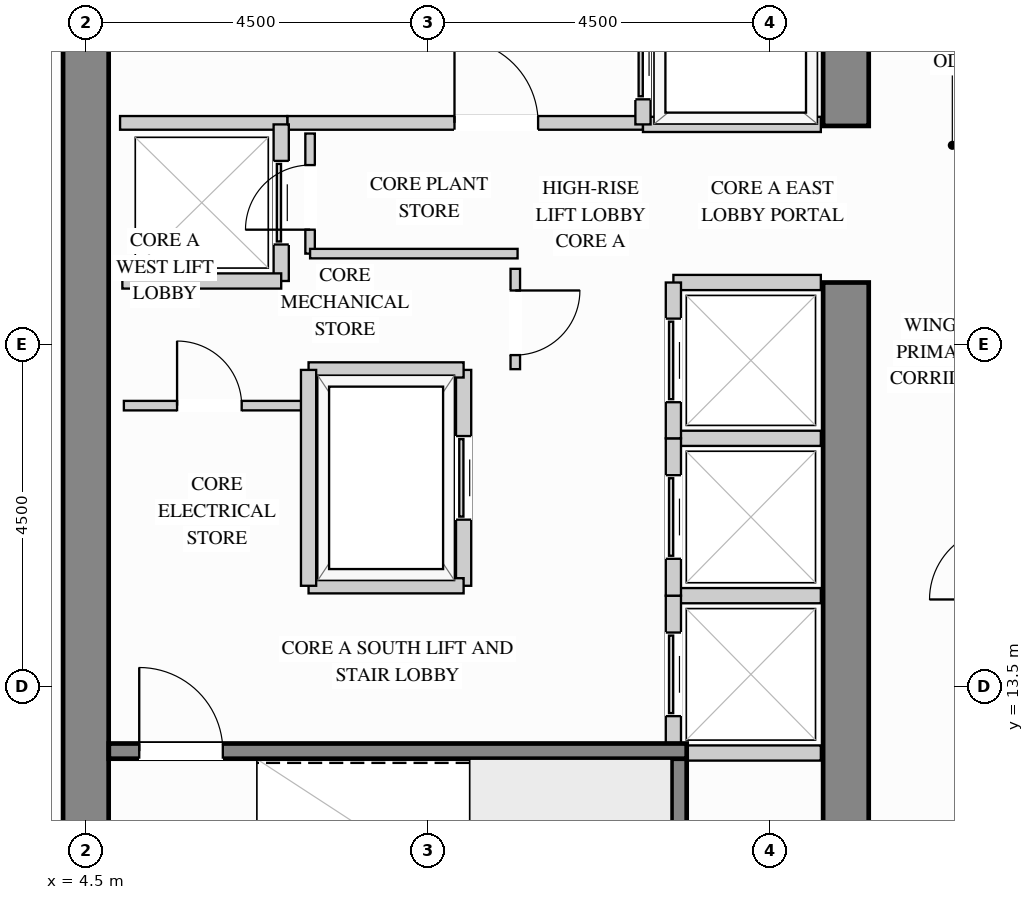
"""IFC4 building model, lengths in metres.
Left out: names, types, materials, properties, quantities, classifications, styles, units other than length and angle.
Written with IfcOpenShell. Run it as: python <this file> out.ifc"""

import sys

from ifc_helpers import new_model, si_unit, direction, frame, frame_2d, origin, place, context, subcontext, project, spatial, rectangle, extrude, source, transform, mapped, element, fill, save


model = new_model("IFC4")
c1 = context("Model", 3, precision=1e-05, world=origin(), true_north=direction((0.0, 1.0)))
c2 = subcontext(c1, "Body", "Model", "MODEL_VIEW")
j1 = project(units=[si_unit("LENGTHUNIT", "METRE"), si_unit("PLANEANGLEUNIT", "RADIAN")], contexts=[c1])
p1 = place(None, origin())
s1 = spatial("IfcSite", under=j1, at=p1, CompositionType="ELEMENT")
p2 = place(p1, origin())
s2 = spatial("IfcBuilding", under=s1, at=p2, CompositionType="ELEMENT")
p3 = place(p2, frame((0.0, 0.0, 197.1)))
s3 = spatial("IfcBuildingStorey", under=s2, at=p3, CompositionType="ELEMENT", Elevation=197.1)
m1 = source(origin(), c2, "Body", "SweptSolid", [
    extrude(rectangle(XDim=10.02, YDim=0.6, at=frame_2d((5.01, 0.0))), origin(), (0.0, 0.0, 1.0), 3.4),
])
p4 = place(p3, frame((14.5, 8.8, 0.0), z_axis=(0.0, 0.0, 1.0), x_axis=(0.0, 1.0, 0.0)))
e1 = element("IfcWall", 1, at=p4, inside=s3, PredefinedType="SHEAR", context=c2, shape_type="MappedRepresentation", body=[
    mapped(m1, transform((0.0, 0.0, 0.0), x_axis=(1.0, 0.0, 0.0), y_axis=(0.0, 1.0, 0.0), z_axis=(0.0, 0.0, 1.0))),
])
m2 = source(origin(), c2, "Body", "SweptSolid", [
    extrude(rectangle(XDim=8.32, YDim=0.6, at=frame_2d((4.16, 0.0))), origin(), (0.0, 0.0, 1.0), 3.4),
])
p5 = place(p3, frame((14.5, 20.88, 0.0), z_axis=(0.0, 0.0, 1.0), x_axis=(0.0, 1.0, 0.0)))
e2 = element("IfcWall", 2, at=p5, inside=s3, PredefinedType="SHEAR", context=c2, shape_type="MappedRepresentation", body=[
    mapped(m2, transform((0.0, 0.0, 0.0), x_axis=(1.0, 0.0, 0.0), y_axis=(0.0, 1.0, 0.0), z_axis=(0.0, 0.0, 1.0))),
])
m3 = source(origin(), c2, "Body", "SweptSolid", [
    extrude(rectangle(XDim=20.4, YDim=0.6, at=frame_2d((10.2, 0.0))), origin(), (0.0, 0.0, 1.0), 3.4),
])
p6 = place(p3, frame((4.5, 8.8, 0.0), z_axis=(0.0, 0.0, 1.0), x_axis=(0.0, 1.0, 0.0)))
e3 = element("IfcWall", 3, at=p6, inside=s3, PredefinedType="SHEAR", context=c2, shape_type="MappedRepresentation", body=[
    mapped(m3, transform((0.0, 0.0, 0.0), x_axis=(1.0, 0.0, 0.0), y_axis=(0.0, 1.0, 0.0), z_axis=(0.0, 0.0, 1.0))),
])
p7 = place(p3, frame((7.15, 20.92, 0.0), z_axis=(0.0, 0.0, 1.0), x_axis=(1.0, 0.0, 0.0)))
e4 = element("IfcWall", 4, at=p7, inside=s3, PredefinedType="PARTITIONING", context=c2, shape_type="SweptSolid", body=[
    extrude(rectangle(XDim=4.68, YDim=0.18, at=frame_2d((2.34, 0.0))), origin(), (0.0, 0.0, 1.0), 3.385),
])
p8 = place(p7, frame((2.2, 0.0, 0.0)))
e5 = element("IfcOpeningElement", 5, at=p8, cuts=e4, PredefinedType="OPENING", context=c2, shape_type="SweptSolid", body=[
    extrude(rectangle(XDim=1.1, YDim=2.15, at=frame_2d((0.55, 1.075))), frame((0.0, 0.1, 0.0), z_axis=(0.0, -1.0, 0.0), x_axis=(1.0, 0.0, 0.0)), (0.0, 0.0, 1.0), 0.2),
])
m4 = source(origin(), c2, "Body", "SweptSolid", [
    extrude(rectangle(XDim=2.2, YDim=0.18, at=frame_2d((1.1, 0.0))), origin(), (0.0, 0.0, 1.0), 3.385),
])
p9 = place(p3, frame((4.95, 20.92, 0.0), z_axis=(0.0, 0.0, 1.0), x_axis=(1.0, 0.0, 0.0)))
e6 = element("IfcWall", 6, at=p9, inside=s3, PredefinedType="PARTITIONING", context=c2, shape_type="MappedRepresentation", body=[
    mapped(m4, transform((0.0, 0.0, 0.0), x_axis=(1.0, 0.0, 0.0), y_axis=(0.0, 1.0, 0.0), z_axis=(0.0, 0.0, 1.0))),
])
p10 = place(p3, frame((10.15, 17.68, 0.0), z_axis=(0.0, 0.0, 1.0), x_axis=(0.0, 1.0, 0.0)))
e7 = element("IfcWall", 7, at=p10, inside=s3, PredefinedType="PARTITIONING", context=c2, shape_type="SweptSolid", body=[
    extrude(rectangle(XDim=1.32, YDim=0.125, at=frame_2d((0.66, 0.0))), origin(), (0.0, 0.0, 1.0), 3.385),
])
p11 = place(p10, frame((0.185, 0.0, 0.0)))
e8 = element("IfcOpeningElement", 8, at=p11, cuts=e7, PredefinedType="OPENING", context=c2, shape_type="SweptSolid", body=[
    extrude(rectangle(XDim=0.85, YDim=2.1, at=frame_2d((0.425, 1.05))), frame((0.0, 0.073, 0.0), z_axis=(0.0, -1.0, 0.0), x_axis=(1.0, 0.0, 0.0)), (0.0, 0.0, 1.0), 0.145),
])
p12 = place(p3, frame((7.45, 19.2, 0.0), z_axis=(0.0, 0.0, 1.0), x_axis=(0.0, 1.0, 0.0)))
e9 = element("IfcWall", 9, at=p12, inside=s3, PredefinedType="PARTITIONING", context=c2, shape_type="SweptSolid", body=[
    extrude(rectangle(XDim=1.58, YDim=0.125, at=frame_2d((0.79, 0.0))), origin(), (0.0, 0.0, 1.0), 3.385),
])
p13 = place(p12, frame((0.315, 0.0, 0.0)))
e10 = element("IfcOpeningElement", 10, at=p13, cuts=e9, PredefinedType="OPENING", context=c2, shape_type="SweptSolid", body=[
    extrude(rectangle(XDim=0.85, YDim=2.1, at=frame_2d((0.425, 1.05))), frame((0.0, 0.073, 0.0), z_axis=(0.0, -1.0, 0.0), x_axis=(1.0, 0.0, 0.0)), (0.0, 0.0, 1.0), 0.145),
])
m5 = source(origin(), c2, "Body", "SweptSolid", [
    extrude(rectangle(XDim=2.73, YDim=0.125, at=frame_2d((1.365, 0.0))), origin(), (0.0, 0.0, 1.0), 3.385),
])
p14 = place(p3, frame((7.45, 19.2, 0.0), z_axis=(0.0, 0.0, 1.0), x_axis=(1.0, 0.0, 0.0)))
e11 = element("IfcWall", 11, at=p14, inside=s3, PredefinedType="PARTITIONING", context=c2, shape_type="MappedRepresentation", body=[
    mapped(m5, transform((0.0, 0.0, 0.0), x_axis=(1.0, 0.0, 0.0), y_axis=(0.0, 1.0, 0.0), z_axis=(0.0, 0.0, 1.0))),
])
p15 = place(p3, frame((5.0, 17.2, 0.0), z_axis=(0.0, 0.0, 1.0), x_axis=(1.0, 0.0, 0.0)))
e12 = element("IfcWall", 12, at=p15, inside=s3, PredefinedType="PARTITIONING", context=c2, shape_type="SweptSolid", body=[
    extrude(rectangle(XDim=2.4, YDim=0.125, at=frame_2d((1.2, 0.0))), origin(), (0.0, 0.0, 1.0), 3.385),
])
p16 = place(p15, frame((0.7, 0.0, 0.0)))
e13 = element("IfcOpeningElement", 13, at=p16, cuts=e12, PredefinedType="OPENING", context=c2, shape_type="SweptSolid", body=[
    extrude(rectangle(XDim=0.85, YDim=2.1, at=frame_2d((0.425, 1.05))), frame((0.0, 0.073, 0.0), z_axis=(0.0, -1.0, 0.0), x_axis=(1.0, 0.0, 0.0)), (0.0, 0.0, 1.0), 0.145),
])
m6 = source(origin(), c2, "Body", "SweptSolid", [
    extrude(rectangle(XDim=2.34, YDim=0.2, at=frame_2d((1.17, 0.0))), origin(), (0.0, 0.0, 1.0), 3.385),
])
p17 = place(p3, frame((11.83, 20.9, 0.0), z_axis=(0.0, 0.0, 1.0), x_axis=(1.0, 0.0, 0.0)))
e14 = element("IfcWall", 14, at=p17, inside=s3, PredefinedType="PARTITIONING", context=c2, shape_type="MappedRepresentation", body=[
    mapped(m6, transform((0.0, 0.0, 0.0), x_axis=(1.0, 0.0, 0.0), y_axis=(0.0, 1.0, 0.0), z_axis=(0.0, 0.0, 1.0))),
])
p18 = place(p3, frame((11.83, 20.9, 0.0), z_axis=(0.0, 0.0, 1.0), x_axis=(0.0, 1.0, 0.0)))
e15 = element("IfcWall", 15, at=p18, inside=s3, PredefinedType="PARTITIONING", context=c2, shape_type="SweptSolid", body=[
    extrude(rectangle(XDim=1.76, YDim=0.2, at=frame_2d((0.88, 0.0))), origin(), (0.0, 0.0, 1.0), 3.385),
])
p19 = place(p18, frame((0.33, 0.0, 0.0)))
e16 = element("IfcOpeningElement", 16, at=p19, cuts=e15, PredefinedType="OPENING", context=c2, shape_type="SweptSolid", body=[
    extrude(rectangle(XDim=1.1, YDim=2.2, at=frame_2d((0.55, 1.1))), frame((0.0, 0.11, 0.0), z_axis=(0.0, -1.0, 0.0), x_axis=(1.0, 0.0, 0.0)), (0.0, 0.0, 1.0), 0.22),
])
m7 = source(origin(), c2, "Body", "SweptSolid", [
    extrude(rectangle(XDim=1.94, YDim=0.2, at=frame_2d((0.97, 0.0))), origin(), (0.0, 0.0, 1.0), 3.385),
])
for number, where, z_axis, x_axis in (
    (17, (12.23, 14.7, 0.0), (0.0, 0.0, 1.0), (1.0, 0.0, 0.0)),
    (18, (12.23, 12.63, 0.0), (0.0, 0.0, 1.0), (1.0, 0.0, 0.0)),
):
    element("IfcWall", number, at=place(p3, frame(where, z_axis=z_axis, x_axis=x_axis)), inside=s3, PredefinedType="PARTITIONING", context=c2, shape_type="MappedRepresentation", body=[
        mapped(m7, transform((0.0, 0.0, 0.0), x_axis=(1.0, 0.0, 0.0), y_axis=(0.0, 1.0, 0.0), z_axis=(0.0, 0.0, 1.0))),
    ])
p20 = place(p3, frame((12.23, 12.63, 0.0), z_axis=(0.0, 0.0, 1.0), x_axis=(0.0, 1.0, 0.0)))
e19 = element("IfcWall", 19, at=p20, inside=s3, PredefinedType="PARTITIONING", context=c2, shape_type="SweptSolid", body=[
    extrude(rectangle(XDim=2.07, YDim=0.2, at=frame_2d((1.035, 0.0))), origin(), (0.0, 0.0, 1.0), 3.385),
])
p21 = place(p20, frame((0.485, 0.0, 0.0)))
e20 = element("IfcOpeningElement", 20, at=p21, cuts=e19, PredefinedType="OPENING", context=c2, shape_type="SweptSolid", body=[
    extrude(rectangle(XDim=1.1, YDim=2.2, at=frame_2d((0.55, 1.1))), frame((0.0, 0.11, 0.0), z_axis=(0.0, -1.0, 0.0), x_axis=(1.0, 0.0, 0.0)), (0.0, 0.0, 1.0), 0.22),
])
p22 = place(p3, frame((12.23, 16.77, 0.0), z_axis=(0.0, 0.0, 1.0), x_axis=(1.0, 0.0, 0.0)))
e21 = element("IfcWall", 21, at=p22, inside=s3, PredefinedType="PARTITIONING", context=c2, shape_type="MappedRepresentation", body=[
    mapped(m7, transform((0.0, 0.0, 0.0), x_axis=(1.0, 0.0, 0.0), y_axis=(0.0, 1.0, 0.0), z_axis=(0.0, 0.0, 1.0))),
])
p23 = place(p3, frame((12.23, 14.7, 0.0), z_axis=(0.0, 0.0, 1.0), x_axis=(0.0, 1.0, 0.0)))
e22 = element("IfcWall", 22, at=p23, inside=s3, PredefinedType="PARTITIONING", context=c2, shape_type="SweptSolid", body=[
    extrude(rectangle(XDim=2.07, YDim=0.2, at=frame_2d((1.035, 0.0))), origin(), (0.0, 0.0, 1.0), 3.385),
])
p24 = place(p23, frame((0.485, 0.0, 0.0)))
e23 = element("IfcOpeningElement", 23, at=p24, cuts=e22, PredefinedType="OPENING", context=c2, shape_type="SweptSolid", body=[
    extrude(rectangle(XDim=1.1, YDim=2.2, at=frame_2d((0.55, 1.1))), frame((0.0, 0.11, 0.0), z_axis=(0.0, -1.0, 0.0), x_axis=(1.0, 0.0, 0.0)), (0.0, 0.0, 1.0), 0.22),
])
p25 = place(p3, frame((12.23, 18.82, 0.0), z_axis=(0.0, 0.0, 1.0), x_axis=(1.0, 0.0, 0.0)))
e24 = element("IfcWall", 24, at=p25, inside=s3, PredefinedType="PARTITIONING", context=c2, shape_type="MappedRepresentation", body=[
    mapped(m7, transform((0.0, 0.0, 0.0), x_axis=(1.0, 0.0, 0.0), y_axis=(0.0, 1.0, 0.0), z_axis=(0.0, 0.0, 1.0))),
])
p26 = place(p3, frame((12.23, 16.77, 0.0), z_axis=(0.0, 0.0, 1.0), x_axis=(0.0, 1.0, 0.0)))
e25 = element("IfcWall", 25, at=p26, inside=s3, PredefinedType="PARTITIONING", context=c2, shape_type="SweptSolid", body=[
    extrude(rectangle(XDim=2.05, YDim=0.2, at=frame_2d((1.025, 0.0))), origin(), (0.0, 0.0, 1.0), 3.385),
])
p27 = place(p26, frame((0.475, 0.0, 0.0)))
e26 = element("IfcOpeningElement", 26, at=p27, cuts=e25, PredefinedType="OPENING", context=c2, shape_type="SweptSolid", body=[
    extrude(rectangle(XDim=1.1, YDim=2.2, at=frame_2d((0.55, 1.1))), frame((0.0, 0.11, 0.0), z_axis=(0.0, -1.0, 0.0), x_axis=(1.0, 0.0, 0.0)), (0.0, 0.0, 1.0), 0.22),
])
p28 = place(p3, frame((7.07, 18.84, 0.0), z_axis=(0.0, 0.0, 1.0), x_axis=(0.0, 1.0, 0.0)))
e27 = element("IfcWall", 27, at=p28, inside=s3, PredefinedType="PARTITIONING", context=c2, shape_type="SweptSolid", body=[
    extrude(rectangle(XDim=2.06, YDim=0.2, at=frame_2d((1.03, 0.0))), origin(), (0.0, 0.0, 1.0), 3.385),
])
p29 = place(p28, frame((0.48, 0.0, 0.0)))
e28 = element("IfcOpeningElement", 28, at=p29, cuts=e27, PredefinedType="OPENING", context=c2, shape_type="SweptSolid", body=[
    extrude(rectangle(XDim=1.1, YDim=2.2, at=frame_2d((0.55, 1.1))), frame((0.0, 0.11, 0.0), z_axis=(0.0, -1.0, 0.0), x_axis=(1.0, 0.0, 0.0)), (0.0, 0.0, 1.0), 0.22),
])
m8 = source(origin(), c2, "Body", "SweptSolid", [
    extrude(rectangle(XDim=2.09, YDim=0.2, at=frame_2d((1.045, 0.0))), origin(), (0.0, 0.0, 1.0), 3.385),
])
p30 = place(p3, frame((4.98, 18.84, 0.0), z_axis=(0.0, 0.0, 1.0), x_axis=(1.0, 0.0, 0.0)))
e29 = element("IfcWall", 29, at=p30, inside=s3, PredefinedType="PARTITIONING", context=c2, shape_type="MappedRepresentation", body=[
    mapped(m8, transform((0.0, 0.0, 0.0), x_axis=(1.0, 0.0, 0.0), y_axis=(0.0, 1.0, 0.0), z_axis=(0.0, 0.0, 1.0))),
])
p31 = place(p3, frame((9.47, 14.83, 0.0), z_axis=(0.0, 0.0, 1.0), x_axis=(0.0, 1.0, 0.0)))
e30 = element("IfcWall", 30, at=p31, inside=s3, PredefinedType="PARTITIONING", context=c2, shape_type="SweptSolid", body=[
    extrude(rectangle(XDim=2.84, YDim=0.2, at=frame_2d((1.42, 0.0))), origin(), (0.0, 0.0, 1.0), 3.385),
])
p32 = place(p31, frame((0.87, 0.0, 0.0)))
e31 = element("IfcOpeningElement", 31, at=p32, cuts=e30, PredefinedType="OPENING", context=c2, shape_type="SweptSolid", body=[
    extrude(rectangle(XDim=1.1, YDim=2.2, at=frame_2d((0.55, 1.1))), frame((0.0, 0.11, 0.0), z_axis=(0.0, -1.0, 0.0), x_axis=(1.0, 0.0, 0.0)), (0.0, 0.0, 1.0), 0.22),
])
m9 = source(origin(), c2, "Body", "SweptSolid", [
    extrude(rectangle(XDim=2.04, YDim=0.2, at=frame_2d((1.02, 0.0))), origin(), (0.0, 0.0, 1.0), 3.385),
])
for number, where, z_axis, x_axis in (
    (32, (7.43, 17.67, 0.0), (0.0, 0.0, 1.0), (1.0, 0.0, 0.0)),
    (33, (7.43, 14.83, 0.0), (0.0, 0.0, 1.0), (1.0, 0.0, 0.0)),
):
    element("IfcWall", number, at=place(p3, frame(where, z_axis=z_axis, x_axis=x_axis)), inside=s3, PredefinedType="PARTITIONING", context=c2, shape_type="MappedRepresentation", body=[
        mapped(m9, transform((0.0, 0.0, 0.0), x_axis=(1.0, 0.0, 0.0), y_axis=(0.0, 1.0, 0.0), z_axis=(0.0, 0.0, 1.0))),
    ])
m10 = source(origin(), c2, "Body", "SweptSolid", [
    extrude(rectangle(XDim=2.84, YDim=0.2, at=frame_2d((1.42, 0.0))), origin(), (0.0, 0.0, 1.0), 3.385),
])
p33 = place(p3, frame((7.43, 14.83, 0.0), z_axis=(0.0, 0.0, 1.0), x_axis=(0.0, 1.0, 0.0)))
e34 = element("IfcWall", 34, at=p33, inside=s3, PredefinedType="PARTITIONING", context=c2, shape_type="MappedRepresentation", body=[
    mapped(m10, transform((0.0, 0.0, 0.0), x_axis=(1.0, 0.0, 0.0), y_axis=(0.0, 1.0, 0.0), z_axis=(0.0, 0.0, 1.0))),
])
m11 = source(origin(), c2, "Body", "SweptSolid", [
    extrude(rectangle(XDim=3.753, YDim=0.2, at=frame_2d((1.876, 0.0))), origin(), (0.0, 0.0, 1.0), 3.4),
])
p34 = place(p3, frame((12.305, 8.802, 0.0), z_axis=(0.0, 0.0, 1.0), x_axis=(0.0, 1.0, 0.0)))
e35 = element("IfcWall", 35, at=p34, inside=s3, PredefinedType="SHEAR", context=c2, shape_type="MappedRepresentation", body=[
    mapped(m11, transform((0.0, 0.0, 0.0), x_axis=(1.0, 0.0, 0.0), y_axis=(0.0, 1.0, 0.0), z_axis=(0.0, 0.0, 1.0))),
])
p35 = place(p3, frame((4.802, 12.655, 0.0), z_axis=(0.0, 0.0, 1.0), x_axis=(1.0, 0.0, 0.0)))
e36 = element("IfcWall", 36, at=p35, inside=s3, PredefinedType="SHEAR", context=c2, shape_type="SweptSolid", body=[
    extrude(rectangle(XDim=7.603, YDim=0.2, at=frame_2d((3.802, 0.0))), origin(), (0.0, 0.0, 1.0), 3.4),
])
p36 = place(p35, frame((0.4, 0.0, 0.0)))
e37 = element("IfcOpeningElement", 37, at=p36, cuts=e36, PredefinedType="OPENING", context=c2, shape_type="SweptSolid", body=[
    extrude(rectangle(XDim=1.1, YDim=2.15, at=frame_2d((0.55, 1.075))), frame((0.0, 0.11, 0.0), z_axis=(0.0, -1.0, 0.0), x_axis=(1.0, 0.0, 0.0)), (0.0, 0.0, 1.0), 0.22),
])
m12 = source(origin(), c2, "Body", "SweptSolid", [
    extrude(rectangle(XDim=1.1, YDim=2.15, at=frame_2d((0.55, 1.075))), frame((0.0, 0.025, 0.0), z_axis=(0.0, -1.0, 0.0), x_axis=(1.0, 0.0, 0.0)), (0.0, 0.0, 1.0), 0.05),
])
p37 = place(p8, origin())
e38 = element("IfcDoor", 38, at=p37, inside=s3, OperationType="SINGLE_SWING_LEFT", PredefinedType="DOOR", context=c2, shape_type="MappedRepresentation", body=[
    mapped(m12, transform((0.0, 0.0, 0.0), x_axis=(1.0, 0.0, 0.0), y_axis=(0.0, 1.0, 0.0), z_axis=(0.0, 0.0, 1.0))),
])
fill(e5, e38)
m13 = source(origin(), c2, "Body", "SweptSolid", [
    extrude(rectangle(XDim=1.1, YDim=2.2, at=frame_2d((0.55, 1.1))), frame((0.0, 0.025, 0.0), z_axis=(0.0, -1.0, 0.0), x_axis=(1.0, 0.0, 0.0)), (0.0, 0.0, 1.0), 0.05),
])
p38 = place(p19, origin())
e39 = element("IfcDoor", 39, at=p38, inside=s3, OperationType="SLIDING_TO_LEFT", PredefinedType="DOOR", context=c2, shape_type="MappedRepresentation", body=[
    mapped(m13, transform((0.0, 0.0, 0.0), x_axis=(1.0, 0.0, 0.0), y_axis=(0.0, 1.0, 0.0), z_axis=(0.0, 0.0, 1.0))),
])
fill(e16, e39)
p39 = place(p21, origin())
e40 = element("IfcDoor", 40, at=p39, inside=s3, OperationType="SLIDING_TO_LEFT", PredefinedType="DOOR", context=c2, shape_type="MappedRepresentation", body=[
    mapped(m13, transform((0.0, 0.0, 0.0), x_axis=(1.0, 0.0, 0.0), y_axis=(0.0, 1.0, 0.0), z_axis=(0.0, 0.0, 1.0))),
])
fill(e20, e40)
p40 = place(p24, origin())
e41 = element("IfcDoor", 41, at=p40, inside=s3, OperationType="SLIDING_TO_LEFT", PredefinedType="DOOR", context=c2, shape_type="MappedRepresentation", body=[
    mapped(m13, transform((0.0, 0.0, 0.0), x_axis=(1.0, 0.0, 0.0), y_axis=(0.0, 1.0, 0.0), z_axis=(0.0, 0.0, 1.0))),
])
fill(e23, e41)
p41 = place(p27, origin())
e42 = element("IfcDoor", 42, at=p41, inside=s3, OperationType="SLIDING_TO_LEFT", PredefinedType="DOOR", context=c2, shape_type="MappedRepresentation", body=[
    mapped(m13, transform((0.0, 0.0, 0.0), x_axis=(1.0, 0.0, 0.0), y_axis=(0.0, 1.0, 0.0), z_axis=(0.0, 0.0, 1.0))),
])
fill(e26, e42)
p42 = place(p29, origin())
e43 = element("IfcDoor", 43, at=p42, inside=s3, OperationType="SLIDING_TO_LEFT", PredefinedType="DOOR", context=c2, shape_type="MappedRepresentation", body=[
    mapped(m13, transform((0.0, 0.0, 0.0), x_axis=(1.0, 0.0, 0.0), y_axis=(0.0, 1.0, 0.0), z_axis=(0.0, 0.0, 1.0))),
])
fill(e28, e43)
p43 = place(p32, origin())
e44 = element("IfcDoor", 44, at=p43, inside=s3, OperationType="SLIDING_TO_LEFT", PredefinedType="DOOR", context=c2, shape_type="MappedRepresentation", body=[
    mapped(m13, transform((0.0, 0.0, 0.0), x_axis=(1.0, 0.0, 0.0), y_axis=(0.0, 1.0, 0.0), z_axis=(0.0, 0.0, 1.0))),
])
fill(e31, e44)
m14 = source(origin(), c2, "Body", "SweptSolid", [
    extrude(rectangle(XDim=0.85, YDim=2.1, at=frame_2d((0.425, 1.05))), frame((0.0, 0.025, 0.0), z_axis=(0.0, -1.0, 0.0), x_axis=(1.0, 0.0, 0.0)), (0.0, 0.0, 1.0), 0.05),
])
p44 = place(p11, origin())
e45 = element("IfcDoor", 45, at=p44, inside=s3, OperationType="SINGLE_SWING_RIGHT", PredefinedType="DOOR", context=c2, shape_type="MappedRepresentation", body=[
    mapped(m14, transform((0.0, 0.0, 0.0), x_axis=(1.0, 0.0, 0.0), y_axis=(0.0, 1.0, 0.0), z_axis=(0.0, 0.0, 1.0))),
])
fill(e8, e45)
p45 = place(p16, origin())
e46 = element("IfcDoor", 46, at=p45, inside=s3, OperationType="SINGLE_SWING_LEFT", PredefinedType="DOOR", context=c2, shape_type="MappedRepresentation", body=[
    mapped(m14, transform((0.0, 0.0, 0.0), x_axis=(1.0, 0.0, 0.0), y_axis=(0.0, 1.0, 0.0), z_axis=(0.0, 0.0, 1.0))),
])
fill(e13, e46)
p46 = place(p13, origin())
e47 = element("IfcDoor", 47, at=p46, inside=s3, OperationType="SINGLE_SWING_LEFT", PredefinedType="DOOR", context=c2, shape_type="MappedRepresentation", body=[
    mapped(m14, transform((0.0, 0.0, 0.0), x_axis=(1.0, 0.0, 0.0), y_axis=(0.0, 1.0, 0.0), z_axis=(0.0, 0.0, 1.0))),
])
fill(e10, e47)
m15 = source(origin(), c2, "Body", "SweptSolid", [
    extrude(rectangle(XDim=1.1, YDim=2.15, at=frame_2d((0.55, 1.075))), frame((0.0, 0.025, 0.0), z_axis=(0.0, -1.0, 0.0), x_axis=(1.0, 0.0, 0.0)), (0.0, 0.0, 1.0), 0.05),
])
p47 = place(p36, origin())
e48 = element("IfcDoor", 48, at=p47, inside=s3, OperationType="SINGLE_SWING_LEFT", PredefinedType="DOOR", context=c2, shape_type="MappedRepresentation", body=[
    mapped(m15, transform((0.0, 0.0, 0.0), x_axis=(1.0, 0.0, 0.0), y_axis=(0.0, 1.0, 0.0), z_axis=(0.0, 0.0, 1.0))),
])
fill(e37, e48)
save(model, sys.argv[1])
